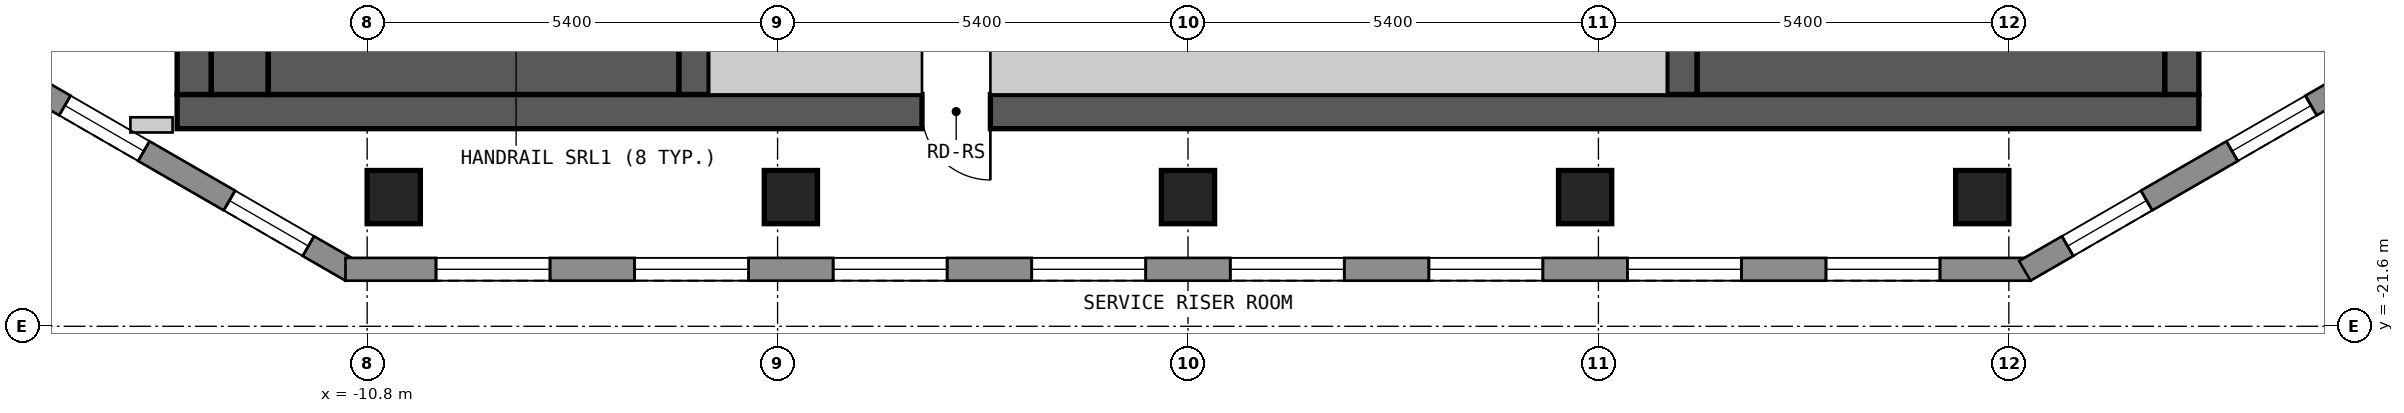
"""IFC4 building model, lengths in metres.
Left out: names, types, materials, properties, quantities, classifications, styles, units other than length and angle.
Written with IfcOpenShell. Run it as: python <this file> out.ifc"""

import sys

from ifc_helpers import new_model, si_unit, direction, frame, frame_2d, origin, origin_2d, place, context, subcontext, project, spatial, polyline, rectangle, outline, extrude, element, fill, save


model = new_model("IFC4")
c1 = context("Model", 3, precision=1e-05, world=origin(), true_north=direction((0.0, 1.0)))
c2 = subcontext(c1, "Body", "Model", "MODEL_VIEW")
j1 = project(units=[si_unit("LENGTHUNIT", "METRE"), si_unit("PLANEANGLEUNIT", "RADIAN")], contexts=[c1])
p1 = place(None, origin())
s1 = spatial("IfcSite", under=j1, at=p1, CompositionType="ELEMENT")
p2 = place(p1, origin())
s2 = spatial("IfcBuilding", under=s1, at=p2, CompositionType="ELEMENT")
p3 = place(p2, frame((0.0, 0.0, 226.8)))
s3 = spatial("IfcBuildingStorey", under=s2, at=p3, CompositionType="ELEMENT", Elevation=226.8)
for number, where, z_axis, x_axis in (
    (1, (-10.45, -19.9, 0.0), (0.0, 0.0, 1.0), (1.0, 0.0, 0.0)),
    (2, (-5.225, -19.9, 0.0), (0.0, 0.0, 1.0), (1.0, 0.0, 0.0)),
    (3, (0.0, -19.9, 0.0), (0.0, 0.0, 1.0), (1.0, 0.0, 0.0)),
    (4, (5.225, -19.9, 0.0), (0.0, 0.0, 1.0), (1.0, 0.0, 0.0)),
    (5, (10.45, -19.9, 0.0), (0.0, 0.0, 1.0), (1.0, 0.0, 0.0)),
):
    element("IfcColumn", number, at=place(p3, frame(where, z_axis=z_axis, x_axis=x_axis)), inside=s3, PredefinedType="COLUMN", context=c2, shape_type="SweptSolid", body=[
        extrude(rectangle(XDim=0.7, YDim=0.7, at=origin_2d()), origin(), (0.0, 0.0, 1.0), 3.0),
    ])
p4 = place(p3, frame((-13.3, -18.775, 0.0), z_axis=(0.0, 0.0, 1.0), x_axis=(1.0, 0.0, 0.0)))
e6 = element("IfcWall", 6, at=p4, inside=s3, PredefinedType="SHEAR", context=c2, shape_type="SweptSolid", body=[
    extrude(rectangle(XDim=26.6, YDim=0.45, at=frame_2d((13.3, 0.0))), origin(), (0.0, 0.0, 1.0), 2.7),
])
p5 = place(p4, frame((9.8, 0.0, 0.0)))
e7 = element("IfcOpeningElement", 7, at=p5, cuts=e6, PredefinedType="OPENING", context=c2, shape_type="SweptSolid", body=[
    extrude(rectangle(XDim=0.9, YDim=2.1, at=frame_2d((0.45, 1.05))), frame((0.0, 0.235, 0.0), z_axis=(0.0, -1.0, 0.0), x_axis=(1.0, 0.0, 0.0)), (0.0, 0.0, 1.0), 0.47),
])
p6 = place(p3, frame((-13.075, -18.55, 0.0), z_axis=(0.0, 0.0, 1.0), x_axis=(0.0, 1.0, 0.0)))
e8 = element("IfcWall", 8, at=p6, inside=s3, PredefinedType="SHEAR", context=c2, shape_type="SweptSolid", body=[
    extrude(rectangle(XDim=13.1, YDim=0.45, at=frame_2d((6.55, 0.0))), origin(), (0.0, 0.0, 1.0), 2.7),
])
p7 = place(p6, frame((4.35, 0.0, 0.0)))
e9 = element("IfcOpeningElement", 9, at=p7, cuts=e8, PredefinedType="OPENING", context=c2, shape_type="SweptSolid", body=[
    extrude(rectangle(XDim=1.2, YDim=2.1, at=frame_2d((0.6, 1.05))), frame((0.0, 0.235, 0.0), z_axis=(0.0, -1.0, 0.0), x_axis=(1.0, 0.0, 0.0)), (0.0, 0.0, 1.0), 0.47),
])
p8 = place(p3, frame((13.075, -18.55, 0.0), z_axis=(0.0, 0.0, 1.0), x_axis=(0.0, 1.0, 0.0)))
e10 = element("IfcWall", 10, at=p8, inside=s3, PredefinedType="SHEAR", context=c2, shape_type="SweptSolid", body=[
    extrude(rectangle(XDim=13.1, YDim=0.45, at=frame_2d((6.55, 0.0))), origin(), (0.0, 0.0, 1.0), 2.7),
])
for number, where, z_axis, x_axis in (
    (11, (-6.5, -18.55, 0.0), (0.0, 0.0, 1.0), (0.0, 1.0, 0.0)),
    (12, (6.5, -18.55, 0.0), (0.0, 0.0, 1.0), (0.0, 1.0, 0.0)),
):
    element("IfcWall", number, at=place(p3, frame(where, z_axis=z_axis, x_axis=x_axis)), inside=s3, PredefinedType="SHEAR", context=c2, shape_type="SweptSolid", body=[
        extrude(rectangle(XDim=3.7, YDim=0.4, at=frame_2d((1.85, 0.0))), origin(), (0.0, 0.0, 1.0), 2.7),
    ])
p9 = place(p3, frame((-15.34, -18.37, 0.0), z_axis=(0.0, 0.0, 1.0), x_axis=(0.866022959057, -0.500004234368, 0.0)))
e13 = element("IfcWall", 13, at=p9, inside=s3, PredefinedType="SOLIDWALL", context=c2, shape_type="SweptSolid", body=[
    extrude(outline(polyline([(0.0, -0.15), (5.0, -0.15), (4.92, 0.15), (0.08, 0.15), (0.0, -0.15)])), origin(), (0.0, 0.0, 1.0), 2.7),
])
p10 = place(p9, frame((0.65, 0.0, 0.15)))
e14 = element("IfcOpeningElement", 14, at=p10, cuts=e13, PredefinedType="OPENING", context=c2, shape_type="SweptSolid", body=[
    extrude(rectangle(XDim=1.2, YDim=2.1, at=frame_2d((0.6, 1.05))), frame((0.0, 0.16, 0.0), z_axis=(0.0, -1.0, 0.0), x_axis=(1.0, 0.0, 0.0)), (0.0, 0.0, 1.0), 0.32),
])
p11 = place(p9, frame((3.15, 0.0, 0.15)))
e15 = element("IfcOpeningElement", 15, at=p11, cuts=e13, PredefinedType="OPENING", context=c2, shape_type="SweptSolid", body=[
    extrude(rectangle(XDim=1.2, YDim=2.1, at=frame_2d((0.6, 1.05))), frame((0.0, 0.16, 0.0), z_axis=(0.0, -1.0, 0.0), x_axis=(1.0, 0.0, 0.0)), (0.0, 0.0, 1.0), 0.32),
])
p12 = place(p3, frame((-11.085, -20.85, 0.0), z_axis=(0.0, 0.0, 1.0), x_axis=(1.0, 0.0, 0.0)))
e16 = element("IfcWall", 16, at=p12, inside=s3, PredefinedType="SOLIDWALL", context=c2, shape_type="SweptSolid", body=[
    extrude(outline(polyline([(0.0, -0.15), (22.17, -0.15), (22.09, 0.15), (0.08, 0.15), (0.0, -0.15)])), origin(), (0.0, 0.0, 1.0), 2.7),
])
p13 = place(p12, frame((1.191, 0.0, 0.15)))
e17 = element("IfcOpeningElement", 17, at=p13, cuts=e16, PredefinedType="OPENING", context=c2, shape_type="SweptSolid", body=[
    extrude(rectangle(XDim=1.5, YDim=2.1, at=frame_2d((0.75, 1.05))), frame((0.0, 0.16, 0.0), z_axis=(0.0, -1.0, 0.0), x_axis=(1.0, 0.0, 0.0)), (0.0, 0.0, 1.0), 0.32),
])
p14 = place(p12, frame((3.804, 0.0, 0.15)))
e18 = element("IfcOpeningElement", 18, at=p14, cuts=e16, PredefinedType="OPENING", context=c2, shape_type="SweptSolid", body=[
    extrude(rectangle(XDim=1.5, YDim=2.1, at=frame_2d((0.75, 1.05))), frame((0.0, 0.16, 0.0), z_axis=(0.0, -1.0, 0.0), x_axis=(1.0, 0.0, 0.0)), (0.0, 0.0, 1.0), 0.32),
])
p15 = place(p12, frame((6.416, 0.0, 0.15)))
e19 = element("IfcOpeningElement", 19, at=p15, cuts=e16, PredefinedType="OPENING", context=c2, shape_type="SweptSolid", body=[
    extrude(rectangle(XDim=1.5, YDim=2.1, at=frame_2d((0.75, 1.05))), frame((0.0, 0.16, 0.0), z_axis=(0.0, -1.0, 0.0), x_axis=(1.0, 0.0, 0.0)), (0.0, 0.0, 1.0), 0.32),
])
p16 = place(p12, frame((9.029, 0.0, 0.15)))
e20 = element("IfcOpeningElement", 20, at=p16, cuts=e16, PredefinedType="OPENING", context=c2, shape_type="SweptSolid", body=[
    extrude(rectangle(XDim=1.5, YDim=2.1, at=frame_2d((0.75, 1.05))), frame((0.0, 0.16, 0.0), z_axis=(0.0, -1.0, 0.0), x_axis=(1.0, 0.0, 0.0)), (0.0, 0.0, 1.0), 0.32),
])
p17 = place(p12, frame((11.641, 0.0, 0.15)))
e21 = element("IfcOpeningElement", 21, at=p17, cuts=e16, PredefinedType="OPENING", context=c2, shape_type="SweptSolid", body=[
    extrude(rectangle(XDim=1.5, YDim=2.1, at=frame_2d((0.75, 1.05))), frame((0.0, 0.16, 0.0), z_axis=(0.0, -1.0, 0.0), x_axis=(1.0, 0.0, 0.0)), (0.0, 0.0, 1.0), 0.32),
])
p18 = place(p12, frame((14.254, 0.0, 0.15)))
e22 = element("IfcOpeningElement", 22, at=p18, cuts=e16, PredefinedType="OPENING", context=c2, shape_type="SweptSolid", body=[
    extrude(rectangle(XDim=1.5, YDim=2.1, at=frame_2d((0.75, 1.05))), frame((0.0, 0.16, 0.0), z_axis=(0.0, -1.0, 0.0), x_axis=(1.0, 0.0, 0.0)), (0.0, 0.0, 1.0), 0.32),
])
p19 = place(p12, frame((16.866, 0.0, 0.15)))
e23 = element("IfcOpeningElement", 23, at=p19, cuts=e16, PredefinedType="OPENING", context=c2, shape_type="SweptSolid", body=[
    extrude(rectangle(XDim=1.5, YDim=2.1, at=frame_2d((0.75, 1.05))), frame((0.0, 0.16, 0.0), z_axis=(0.0, -1.0, 0.0), x_axis=(1.0, 0.0, 0.0)), (0.0, 0.0, 1.0), 0.32),
])
p20 = place(p12, frame((19.479, 0.0, 0.15)))
e24 = element("IfcOpeningElement", 24, at=p20, cuts=e16, PredefinedType="OPENING", context=c2, shape_type="SweptSolid", body=[
    extrude(rectangle(XDim=1.5, YDim=2.1, at=frame_2d((0.75, 1.05))), frame((0.0, 0.16, 0.0), z_axis=(0.0, -1.0, 0.0), x_axis=(1.0, 0.0, 0.0)), (0.0, 0.0, 1.0), 0.32),
])
p21 = place(p3, frame((11.01, -20.87, 0.0), z_axis=(0.0, 0.0, 1.0), x_axis=(0.866022959057, 0.500004234368, 0.0)))
e25 = element("IfcWall", 25, at=p21, inside=s3, PredefinedType="SOLIDWALL", context=c2, shape_type="SweptSolid", body=[
    extrude(outline(polyline([(0.0, -0.15), (5.0, -0.15), (4.92, 0.15), (0.08, 0.15), (0.0, -0.15)])), origin(), (0.0, 0.0, 1.0), 2.7),
])
p22 = place(p21, frame((0.65, 0.0, 0.15)))
e26 = element("IfcOpeningElement", 26, at=p22, cuts=e25, PredefinedType="OPENING", context=c2, shape_type="SweptSolid", body=[
    extrude(rectangle(XDim=1.2, YDim=2.1, at=frame_2d((0.6, 1.05))), frame((0.0, 0.16, 0.0), z_axis=(0.0, -1.0, 0.0), x_axis=(1.0, 0.0, 0.0)), (0.0, 0.0, 1.0), 0.32),
])
p23 = place(p21, frame((3.149, 0.0, 0.15)))
e27 = element("IfcOpeningElement", 27, at=p23, cuts=e25, PredefinedType="OPENING", context=c2, shape_type="SweptSolid", body=[
    extrude(rectangle(XDim=1.2, YDim=2.1, at=frame_2d((0.6, 1.05))), frame((0.0, 0.16, 0.0), z_axis=(0.0, -1.0, 0.0), x_axis=(1.0, 0.0, 0.0)), (0.0, 0.0, 1.0), 0.32),
])
p24 = place(p3, frame((-13.915, -18.95, 0.0), z_axis=(0.0, 0.0, 1.0), x_axis=(1.0, 0.0, 0.0)))
e28 = element("IfcWall", 28, at=p24, inside=s3, PredefinedType="PARTITIONING", context=c2, shape_type="SweptSolid", body=[
    extrude(rectangle(XDim=0.555, YDim=0.2, at=frame_2d((0.277, 0.0))), origin(), (0.0, 0.0, 1.0), 2.7),
])
p25 = place(p3, frame((-12.475, -18.55, 0.0), z_axis=(0.0, 0.0, 1.0), x_axis=(0.0, 1.0, 0.0)))
e29 = element("IfcWall", 29, at=p25, inside=s3, PredefinedType="SOLIDWALL", context=c2, shape_type="SweptSolid", body=[
    extrude(rectangle(XDim=3.7, YDim=0.75, at=frame_2d((1.85, 0.0))), origin(), (0.0, 0.0, 1.0), 2.7),
])
p26 = place(p3, frame((-12.1, -18.175, 0.0), z_axis=(0.0, 0.0, 1.0), x_axis=(1.0, 0.0, 0.0)))
e30 = element("IfcWall", 30, at=p26, inside=s3, PredefinedType="SOLIDWALL", context=c2, shape_type="SweptSolid", body=[
    extrude(rectangle(XDim=5.4, YDim=0.75, at=frame_2d((2.7, 0.0))), origin(), (0.0, 0.0, 1.0), 2.7),
])
p27 = place(p3, frame((-6.3, -18.175, 0.0), z_axis=(0.0, 0.0, 1.0), x_axis=(1.0, 0.0, 0.0)))
e31 = element("IfcWall", 31, at=p27, inside=s3, PredefinedType="PARTITIONING", context=c2, shape_type="SweptSolid", body=[
    extrude(rectangle(XDim=2.8, YDim=0.75, at=frame_2d((1.4, 0.0))), origin(), (0.0, 0.0, 1.0), 2.7),
])
p28 = place(p3, frame((-2.6, -18.175, 0.0), z_axis=(0.0, 0.0, 1.0), x_axis=(1.0, 0.0, 0.0)))
e32 = element("IfcWall", 32, at=p28, inside=s3, PredefinedType="PARTITIONING", context=c2, shape_type="SweptSolid", body=[
    extrude(rectangle(XDim=8.9, YDim=0.75, at=frame_2d((4.45, 0.0))), origin(), (0.0, 0.0, 1.0), 2.7),
])
p29 = place(p3, frame((6.7, -18.075, 0.0), z_axis=(0.0, 0.0, 1.0), x_axis=(1.0, 0.0, 0.0)))
e33 = element("IfcWall", 33, at=p29, inside=s3, PredefinedType="SOLIDWALL", context=c2, shape_type="SweptSolid", body=[
    extrude(rectangle(XDim=6.15, YDim=0.95, at=frame_2d((3.075, 0.0))), origin(), (0.0, 0.0, 1.0), 2.7),
])
p30 = place(p10, origin())
e34 = element("IfcWindow", 34, at=p30, inside=s3, PartitioningType="SINGLE_PANEL", PredefinedType="WINDOW", context=c2, shape_type="SweptSolid", body=[
    extrude(rectangle(XDim=1.2, YDim=2.1, at=frame_2d((0.6, 1.05))), frame((0.0, 0.03, 0.0), z_axis=(0.0, -1.0, 0.0), x_axis=(1.0, 0.0, 0.0)), (0.0, 0.0, 1.0), 0.06),
])
fill(e14, e34)
p31 = place(p11, origin())
e35 = element("IfcWindow", 35, at=p31, inside=s3, PartitioningType="SINGLE_PANEL", PredefinedType="WINDOW", context=c2, shape_type="SweptSolid", body=[
    extrude(rectangle(XDim=1.2, YDim=2.1, at=frame_2d((0.6, 1.05))), frame((0.0, 0.03, 0.0), z_axis=(0.0, -1.0, 0.0), x_axis=(1.0, 0.0, 0.0)), (0.0, 0.0, 1.0), 0.06),
])
fill(e15, e35)
p32 = place(p13, origin())
e36 = element("IfcWindow", 36, at=p32, inside=s3, PartitioningType="SINGLE_PANEL", PredefinedType="WINDOW", context=c2, shape_type="SweptSolid", body=[
    extrude(rectangle(XDim=1.5, YDim=2.1, at=frame_2d((0.75, 1.05))), frame((0.0, 0.03, 0.0), z_axis=(0.0, -1.0, 0.0), x_axis=(1.0, 0.0, 0.0)), (0.0, 0.0, 1.0), 0.06),
])
fill(e17, e36)
p33 = place(p14, origin())
e37 = element("IfcWindow", 37, at=p33, inside=s3, PartitioningType="SINGLE_PANEL", PredefinedType="WINDOW", context=c2, shape_type="SweptSolid", body=[
    extrude(rectangle(XDim=1.5, YDim=2.1, at=frame_2d((0.75, 1.05))), frame((0.0, 0.03, 0.0), z_axis=(0.0, -1.0, 0.0), x_axis=(1.0, 0.0, 0.0)), (0.0, 0.0, 1.0), 0.06),
])
fill(e18, e37)
p34 = place(p15, origin())
e38 = element("IfcWindow", 38, at=p34, inside=s3, PartitioningType="SINGLE_PANEL", PredefinedType="WINDOW", context=c2, shape_type="SweptSolid", body=[
    extrude(rectangle(XDim=1.5, YDim=2.1, at=frame_2d((0.75, 1.05))), frame((0.0, 0.03, 0.0), z_axis=(0.0, -1.0, 0.0), x_axis=(1.0, 0.0, 0.0)), (0.0, 0.0, 1.0), 0.06),
])
fill(e19, e38)
p35 = place(p16, origin())
e39 = element("IfcWindow", 39, at=p35, inside=s3, PartitioningType="SINGLE_PANEL", PredefinedType="WINDOW", context=c2, shape_type="SweptSolid", body=[
    extrude(rectangle(XDim=1.5, YDim=2.1, at=frame_2d((0.75, 1.05))), frame((0.0, 0.03, 0.0), z_axis=(0.0, -1.0, 0.0), x_axis=(1.0, 0.0, 0.0)), (0.0, 0.0, 1.0), 0.06),
])
fill(e20, e39)
p36 = place(p17, origin())
e40 = element("IfcWindow", 40, at=p36, inside=s3, PartitioningType="SINGLE_PANEL", PredefinedType="WINDOW", context=c2, shape_type="SweptSolid", body=[
    extrude(rectangle(XDim=1.5, YDim=2.1, at=frame_2d((0.75, 1.05))), frame((0.0, 0.03, 0.0), z_axis=(0.0, -1.0, 0.0), x_axis=(1.0, 0.0, 0.0)), (0.0, 0.0, 1.0), 0.06),
])
fill(e21, e40)
p37 = place(p18, origin())
e41 = element("IfcWindow", 41, at=p37, inside=s3, PartitioningType="SINGLE_PANEL", PredefinedType="WINDOW", context=c2, shape_type="SweptSolid", body=[
    extrude(rectangle(XDim=1.5, YDim=2.1, at=frame_2d((0.75, 1.05))), frame((0.0, 0.03, 0.0), z_axis=(0.0, -1.0, 0.0), x_axis=(1.0, 0.0, 0.0)), (0.0, 0.0, 1.0), 0.06),
])
fill(e22, e41)
p38 = place(p19, origin())
e42 = element("IfcWindow", 42, at=p38, inside=s3, PartitioningType="SINGLE_PANEL", PredefinedType="WINDOW", context=c2, shape_type="SweptSolid", body=[
    extrude(rectangle(XDim=1.5, YDim=2.1, at=frame_2d((0.75, 1.05))), frame((0.0, 0.03, 0.0), z_axis=(0.0, -1.0, 0.0), x_axis=(1.0, 0.0, 0.0)), (0.0, 0.0, 1.0), 0.06),
])
fill(e23, e42)
p39 = place(p20, origin())
e43 = element("IfcWindow", 43, at=p39, inside=s3, PartitioningType="SINGLE_PANEL", PredefinedType="WINDOW", context=c2, shape_type="SweptSolid", body=[
    extrude(rectangle(XDim=1.5, YDim=2.1, at=frame_2d((0.75, 1.05))), frame((0.0, 0.03, 0.0), z_axis=(0.0, -1.0, 0.0), x_axis=(1.0, 0.0, 0.0)), (0.0, 0.0, 1.0), 0.06),
])
fill(e24, e43)
p40 = place(p22, origin())
e44 = element("IfcWindow", 44, at=p40, inside=s3, PartitioningType="SINGLE_PANEL", PredefinedType="WINDOW", context=c2, shape_type="SweptSolid", body=[
    extrude(rectangle(XDim=1.2, YDim=2.1, at=frame_2d((0.6, 1.05))), frame((0.0, 0.03, 0.0), z_axis=(0.0, -1.0, 0.0), x_axis=(1.0, 0.0, 0.0)), (0.0, 0.0, 1.0), 0.06),
])
fill(e26, e44)
p41 = place(p23, origin())
e45 = element("IfcWindow", 45, at=p41, inside=s3, PartitioningType="SINGLE_PANEL", PredefinedType="WINDOW", context=c2, shape_type="SweptSolid", body=[
    extrude(rectangle(XDim=1.2, YDim=2.1, at=frame_2d((0.6, 1.05))), frame((0.0, 0.03, 0.0), z_axis=(0.0, -1.0, 0.0), x_axis=(1.0, 0.0, 0.0)), (0.0, 0.0, 1.0), 0.06),
])
fill(e27, e45)
p42 = place(p5, origin())
e46 = element("IfcDoor", 46, at=p42, inside=s3, OperationType="SINGLE_SWING_RIGHT", PredefinedType="DOOR", context=c2, shape_type="SweptSolid", body=[
    extrude(rectangle(XDim=0.9, YDim=2.1, at=frame_2d((0.45, 1.05))), frame((0.0, 0.025, 0.0), z_axis=(0.0, -1.0, 0.0), x_axis=(1.0, 0.0, 0.0)), (0.0, 0.0, 1.0), 0.05),
])
fill(e7, e46)
save(model, sys.argv[1])
